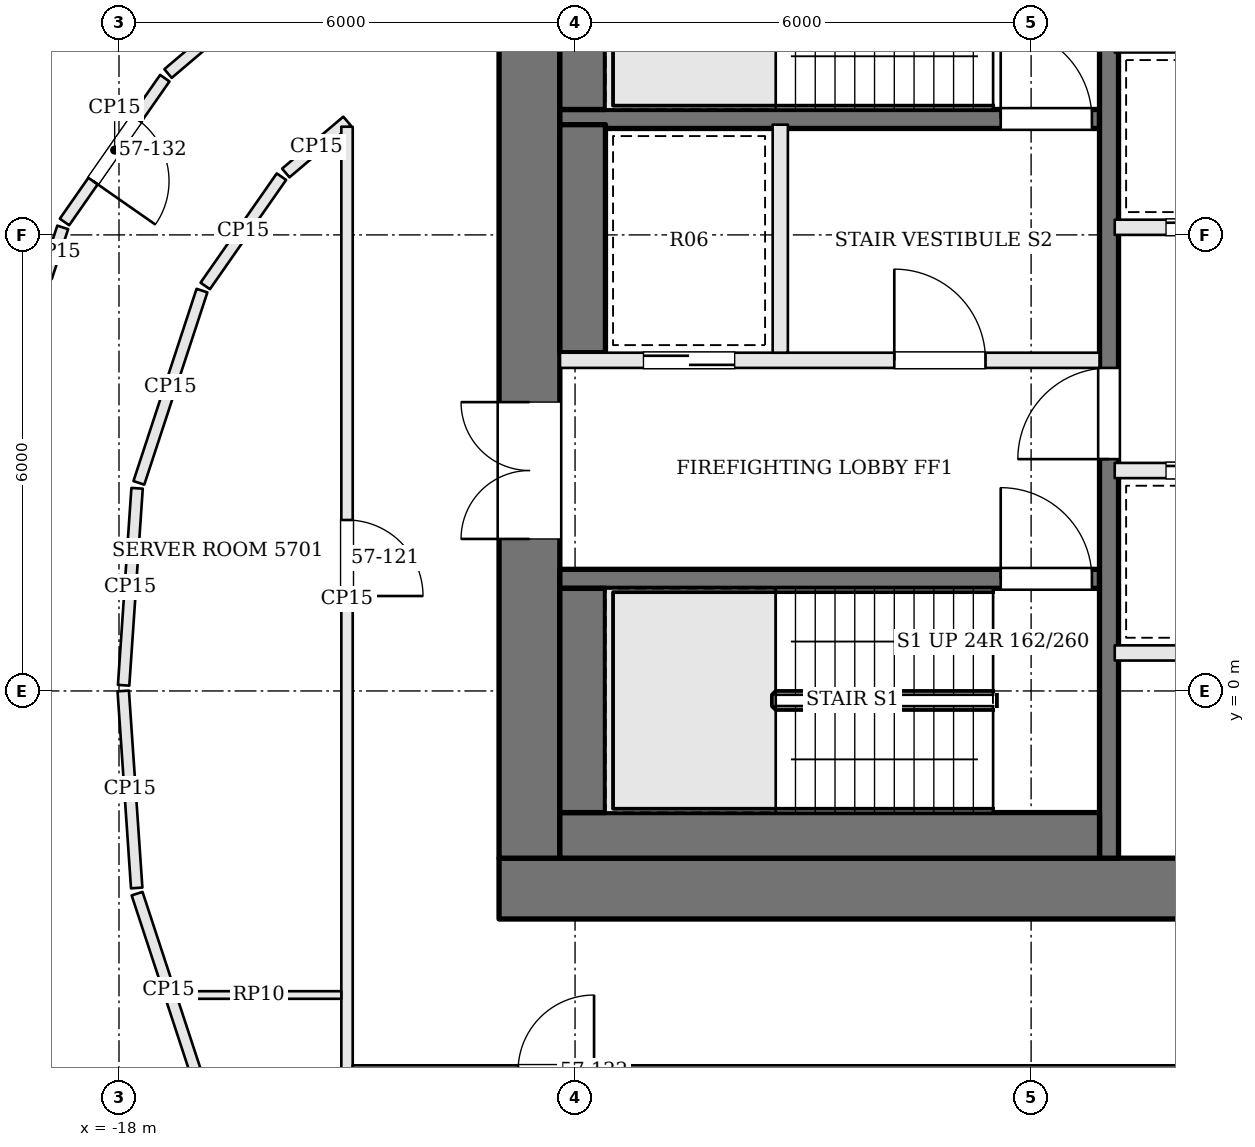
"""IFC4 building model, lengths in metres.
Left out: names, types, materials, properties, quantities, classifications, styles, units other than length and angle.
Written with IfcOpenShell. Run it as: python <this file> out.ifc"""

import sys

from ifc_helpers import new_model, si_unit, direction, frame, frame_2d, origin, place, context, subcontext, project, spatial, rectangle, extrude, element, fill, save


model = new_model("IFC4")
c1 = context("Model", 3, precision=1e-05, world=origin(), true_north=direction((0.0, 1.0)))
c2 = subcontext(c1, "Body", "Model", "MODEL_VIEW")
j1 = project(units=[si_unit("LENGTHUNIT", "METRE"), si_unit("PLANEANGLEUNIT", "RADIAN")], contexts=[c1])
p1 = place(None, origin())
s1 = spatial("IfcSite", under=j1, at=p1, CompositionType="ELEMENT")
p2 = place(p1, origin())
s2 = spatial("IfcBuilding", under=s1, at=p2, CompositionType="ELEMENT")
p3 = place(p2, frame((0.0, 0.0, 233.1)))
s3 = spatial("IfcBuildingStorey", under=s2, at=p3, CompositionType="ELEMENT", Elevation=233.1)
p4 = place(p3, frame((-13.0, -2.6, 0.0), z_axis=(0.0, 0.0, 1.0), x_axis=(1.0, 0.0, 0.0)))
e1 = element("IfcWall", 1, at=p4, inside=s3, PredefinedType="SHEAR", context=c2, shape_type="SweptSolid", body=[
    extrude(rectangle(XDim=26.0, YDim=0.8, at=frame_2d((13.0, 0.0))), origin(), (0.0, 0.0, 1.0), 3.9),
])
p5 = place(p4, frame((9.2, 0.0, 0.0)))
e2 = element("IfcOpeningElement", 2, at=p5, cuts=e1, PredefinedType="OPENING", context=c2, shape_type="SweptSolid", body=[
    extrude(rectangle(XDim=0.9, YDim=2.1, at=frame_2d((0.45, 1.05))), frame((0.0, 0.41, 0.0), z_axis=(0.0, -1.0, 0.0), x_axis=(1.0, 0.0, 0.0)), (0.0, 0.0, 1.0), 0.82),
])
p6 = place(p4, frame((12.3, 0.0, 0.0)))
e3 = element("IfcOpeningElement", 3, at=p6, cuts=e1, PredefinedType="OPENING", context=c2, shape_type="SweptSolid", body=[
    extrude(rectangle(XDim=0.9, YDim=2.1, at=frame_2d((0.45, 1.05))), frame((0.0, 0.41, 0.0), z_axis=(0.0, -1.0, 0.0), x_axis=(1.0, 0.0, 0.0)), (0.0, 0.0, 1.0), 0.82),
])
p7 = place(p4, frame((14.7, 0.0, 0.0)))
e4 = element("IfcOpeningElement", 4, at=p7, cuts=e1, PredefinedType="OPENING", context=c2, shape_type="SweptSolid", body=[
    extrude(rectangle(XDim=1.0, YDim=2.1, at=frame_2d((0.5, 1.05))), frame((0.0, 0.41, 0.0), z_axis=(0.0, -1.0, 0.0), x_axis=(1.0, 0.0, 0.0)), (0.0, 0.0, 1.0), 0.82),
])
p8 = place(p4, frame((16.55, 0.0, 0.0)))
e5 = element("IfcOpeningElement", 5, at=p8, cuts=e1, PredefinedType="OPENING", context=c2, shape_type="SweptSolid", body=[
    extrude(rectangle(XDim=0.9, YDim=2.1, at=frame_2d((0.45, 1.05))), frame((0.0, 0.41, 0.0), z_axis=(0.0, -1.0, 0.0), x_axis=(1.0, 0.0, 0.0)), (0.0, 0.0, 1.0), 0.82),
])
p9 = place(p3, frame((-12.6, -2.2, 0.0), z_axis=(0.0, 0.0, 1.0), x_axis=(0.0, 1.0, 0.0)))
e6 = element("IfcWall", 6, at=p9, inside=s3, PredefinedType="SHEAR", context=c2, shape_type="SweptSolid", body=[
    extrude(rectangle(XDim=13.4, YDim=0.8, at=frame_2d((6.7, 0.0))), origin(), (0.0, 0.0, 1.0), 3.9),
])
p10 = place(p9, frame((4.2, 0.0, 0.0)))
e7 = element("IfcOpeningElement", 7, at=p10, cuts=e6, PredefinedType="OPENING", context=c2, shape_type="SweptSolid", body=[
    extrude(rectangle(XDim=1.8, YDim=2.1, at=frame_2d((0.9, 1.05))), frame((0.0, 0.41, 0.0), z_axis=(0.0, -1.0, 0.0), x_axis=(1.0, 0.0, 0.0)), (0.0, 0.0, 1.0), 0.82),
])
p11 = place(p3, frame((-12.2, 1.475, 0.0), z_axis=(0.0, 0.0, 1.0), x_axis=(1.0, 0.0, 0.0)))
e8 = element("IfcWall", 8, at=p11, inside=s3, PredefinedType="SOLIDWALL", context=c2, shape_type="SweptSolid", body=[
    extrude(rectangle(XDim=7.1, YDim=0.25, at=frame_2d((3.55, 0.0))), origin(), (0.0, 0.0, 1.0), 3.7),
])
p12 = place(p11, frame((5.8, 0.0, 0.0)))
e9 = element("IfcOpeningElement", 9, at=p12, cuts=e8, PredefinedType="OPENING", context=c2, shape_type="SweptSolid", body=[
    extrude(rectangle(XDim=1.2, YDim=2.1, at=frame_2d((0.6, 1.05))), frame((0.0, 0.135, 0.0), z_axis=(0.0, -1.0, 0.0), x_axis=(1.0, 0.0, 0.0)), (0.0, 0.0, 1.0), 0.27),
])
p13 = place(p3, frame((-12.2, 4.35, 0.0), z_axis=(0.0, 0.0, 1.0), x_axis=(1.0, 0.0, 0.0)))
e10 = element("IfcWall", 10, at=p13, inside=s3, PredefinedType="SOLIDWALL", context=c2, shape_type="SweptSolid", body=[
    extrude(rectangle(XDim=7.1, YDim=0.2, at=frame_2d((3.55, 0.0))), origin(), (0.0, 0.0, 1.0), 3.7),
])
p14 = place(p13, frame((4.4, 0.0, 0.0)))
e11 = element("IfcOpeningElement", 11, at=p14, cuts=e10, PredefinedType="OPENING", context=c2, shape_type="SweptSolid", body=[
    extrude(rectangle(XDim=1.2, YDim=2.1, at=frame_2d((0.6, 1.05))), frame((0.0, 0.11, 0.0), z_axis=(0.0, -1.0, 0.0), x_axis=(1.0, 0.0, 0.0)), (0.0, 0.0, 1.0), 0.22),
])
p15 = place(p13, frame((1.1, 0.0, 0.0)))
e12 = element("IfcOpeningElement", 12, at=p15, cuts=e10, PredefinedType="OPENING", context=c2, shape_type="SweptSolid", body=[
    extrude(rectangle(XDim=1.2, YDim=2.1, at=frame_2d((0.6, 1.05))), frame((0.0, 0.11, 0.0), z_axis=(0.0, -1.0, 0.0), x_axis=(1.0, 0.0, 0.0)), (0.0, 0.0, 1.0), 0.22),
])
p16 = place(p3, frame((-12.2, 7.525, 0.0), z_axis=(0.0, 0.0, 1.0), x_axis=(1.0, 0.0, 0.0)))
e13 = element("IfcWall", 13, at=p16, inside=s3, PredefinedType="SOLIDWALL", context=c2, shape_type="SweptSolid", body=[
    extrude(rectangle(XDim=7.1, YDim=0.25, at=frame_2d((3.55, 0.0))), origin(), (0.0, 0.0, 1.0), 3.7),
])
p17 = place(p16, frame((5.8, 0.0, 0.0)))
e14 = element("IfcOpeningElement", 14, at=p17, cuts=e13, PredefinedType="OPENING", context=c2, shape_type="SweptSolid", body=[
    extrude(rectangle(XDim=1.2, YDim=2.1, at=frame_2d((0.6, 1.05))), frame((0.0, 0.135, 0.0), z_axis=(0.0, -1.0, 0.0), x_axis=(1.0, 0.0, 0.0)), (0.0, 0.0, 1.0), 0.27),
])
p18 = place(p3, frame((-9.3, 4.45, 0.0), z_axis=(0.0, 0.0, 1.0), x_axis=(0.0, 1.0, 0.0)))
e15 = element("IfcWall", 15, at=p18, inside=s3, PredefinedType="SOLIDWALL", context=c2, shape_type="SweptSolid", body=[
    extrude(rectangle(XDim=3.0, YDim=0.2, at=frame_2d((1.5, 0.0))), origin(), (0.0, 0.0, 1.0), 3.7),
])
p19 = place(p3, frame((-4.975, -2.2, 0.0), z_axis=(0.0, 0.0, 1.0), x_axis=(0.0, 1.0, 0.0)))
e16 = element("IfcWall", 16, at=p19, inside=s3, PredefinedType="SOLIDWALL", context=c2, shape_type="SweptSolid", body=[
    extrude(rectangle(XDim=13.4, YDim=0.25, at=frame_2d((6.7, 0.0))), origin(), (0.0, 0.0, 1.0), 3.7),
])
p20 = place(p19, frame((5.25, 0.0, 0.0)))
e17 = element("IfcOpeningElement", 17, at=p20, cuts=e16, PredefinedType="OPENING", context=c2, shape_type="SweptSolid", body=[
    extrude(rectangle(XDim=1.2, YDim=2.1, at=frame_2d((0.6, 1.05))), frame((0.0, 0.135, 0.0), z_axis=(0.0, -1.0, 0.0), x_axis=(1.0, 0.0, 0.0)), (0.0, 0.0, 1.0), 0.27),
])
p21 = place(p3, frame((-12.2, -1.9, 0.0), z_axis=(0.0, 0.0, 1.0), x_axis=(1.0, 0.0, 0.0)))
e18 = element("IfcWall", 18, at=p21, inside=s3, PredefinedType="SOLIDWALL", context=c2, shape_type="SweptSolid", body=[
    extrude(rectangle(XDim=7.1, YDim=0.6, at=frame_2d((3.55, 0.0))), origin(), (0.0, 0.0, 1.0), 3.7),
])
p22 = place(p3, frame((-11.9, -1.6, 0.0), z_axis=(0.0, 0.0, 1.0), x_axis=(0.0, 1.0, 0.0)))
e19 = element("IfcWall", 19, at=p22, inside=s3, PredefinedType="SOLIDWALL", context=c2, shape_type="SweptSolid", body=[
    extrude(rectangle(XDim=2.95, YDim=0.6, at=frame_2d((1.475, 0.0))), origin(), (0.0, 0.0, 1.0), 3.7),
])
p23 = place(p3, frame((-11.9, 4.45, 0.0), z_axis=(0.0, 0.0, 1.0), x_axis=(0.0, 1.0, 0.0)))
e20 = element("IfcWall", 20, at=p23, inside=s3, PredefinedType="SOLIDWALL", context=c2, shape_type="SweptSolid", body=[
    extrude(rectangle(XDim=3.0, YDim=0.6, at=frame_2d((1.5, 0.0))), origin(), (0.0, 0.0, 1.0), 3.7),
])
p24 = place(p3, frame((-11.9, 7.65, 0.0), z_axis=(0.0, 0.0, 1.0), x_axis=(0.0, 1.0, 0.0)))
e21 = element("IfcWall", 21, at=p24, inside=s3, PredefinedType="SOLIDWALL", context=c2, shape_type="SweptSolid", body=[
    extrude(rectangle(XDim=2.95, YDim=0.6, at=frame_2d((1.475, 0.0))), origin(), (0.0, 0.0, 1.0), 3.7),
])
p25 = place(p3, frame((-4.9, 0.5, 0.0), z_axis=(0.0, 0.0, 1.0), x_axis=(1.0, 0.0, 0.0)))
e22 = element("IfcWall", 22, at=p25, inside=s3, PredefinedType="SOLIDWALL", context=c2, shape_type="SweptSolid", body=[
    extrude(rectangle(XDim=9.8, YDim=0.2, at=frame_2d((4.9, 0.0))), origin(), (0.0, 0.0, 1.0), 3.7),
])
p26 = place(p3, frame((-4.9, 2.9, 0.0), z_axis=(0.0, 0.0, 1.0), x_axis=(1.0, 0.0, 0.0)))
e23 = element("IfcWall", 23, at=p26, inside=s3, PredefinedType="SOLIDWALL", context=c2, shape_type="SweptSolid", body=[
    extrude(rectangle(XDim=9.8, YDim=0.2, at=frame_2d((4.9, 0.0))), origin(), (0.0, 0.0, 1.0), 3.7),
])
p27 = place(p26, frame((0.675, 0.0, 0.0)))
e24 = element("IfcOpeningElement", 24, at=p27, cuts=e23, PredefinedType="OPENING", context=c2, shape_type="SweptSolid", body=[
    extrude(rectangle(XDim=1.1, YDim=2.1, at=frame_2d((0.55, 1.05))), frame((0.0, 0.11, 0.0), z_axis=(0.0, -1.0, 0.0), x_axis=(1.0, 0.0, 0.0)), (0.0, 0.0, 1.0), 0.22),
])
p28 = place(p26, frame((2.613, 0.0, 0.0)))
e25 = element("IfcOpeningElement", 25, at=p28, cuts=e23, PredefinedType="OPENING", context=c2, shape_type="SweptSolid", body=[
    extrude(rectangle(XDim=0.9, YDim=2.1, at=frame_2d((0.45, 1.05))), frame((0.0, 0.11, 0.0), z_axis=(0.0, -1.0, 0.0), x_axis=(1.0, 0.0, 0.0)), (0.0, 0.0, 1.0), 0.22),
])
p29 = place(p26, frame((4.35, 0.0, 0.0)))
e26 = element("IfcOpeningElement", 26, at=p29, cuts=e23, PredefinedType="OPENING", context=c2, shape_type="SweptSolid", body=[
    extrude(rectangle(XDim=1.1, YDim=2.1, at=frame_2d((0.55, 1.05))), frame((0.0, 0.11, 0.0), z_axis=(0.0, -1.0, 0.0), x_axis=(1.0, 0.0, 0.0)), (0.0, 0.0, 1.0), 0.22),
])
p30 = place(p26, frame((7.463, 0.0, 0.0)))
e27 = element("IfcOpeningElement", 27, at=p30, cuts=e23, PredefinedType="OPENING", context=c2, shape_type="SweptSolid", body=[
    extrude(rectangle(XDim=1.0, YDim=2.1, at=frame_2d((0.5, 1.05))), frame((0.0, 0.11, 0.0), z_axis=(0.0, -1.0, 0.0), x_axis=(1.0, 0.0, 0.0)), (0.0, 0.0, 1.0), 0.22),
])
p31 = place(p3, frame((-4.9, 6.1, 0.0), z_axis=(0.0, 0.0, 1.0), x_axis=(1.0, 0.0, 0.0)))
e28 = element("IfcWall", 28, at=p31, inside=s3, PredefinedType="SOLIDWALL", context=c2, shape_type="SweptSolid", body=[
    extrude(rectangle(XDim=9.8, YDim=0.2, at=frame_2d((4.9, 0.0))), origin(), (0.0, 0.0, 1.0), 3.7),
])
p32 = place(p31, frame((0.675, 0.0, 0.0)))
e29 = element("IfcOpeningElement", 29, at=p32, cuts=e28, PredefinedType="OPENING", context=c2, shape_type="SweptSolid", body=[
    extrude(rectangle(XDim=1.1, YDim=2.1, at=frame_2d((0.55, 1.05))), frame((0.0, 0.11, 0.0), z_axis=(0.0, -1.0, 0.0), x_axis=(1.0, 0.0, 0.0)), (0.0, 0.0, 1.0), 0.22),
])
p33 = place(p31, frame((3.125, 0.0, 0.0)))
e30 = element("IfcOpeningElement", 30, at=p33, cuts=e28, PredefinedType="OPENING", context=c2, shape_type="SweptSolid", body=[
    extrude(rectangle(XDim=1.1, YDim=2.1, at=frame_2d((0.55, 1.05))), frame((0.0, 0.11, 0.0), z_axis=(0.0, -1.0, 0.0), x_axis=(1.0, 0.0, 0.0)), (0.0, 0.0, 1.0), 0.22),
])
p34 = place(p31, frame((5.575, 0.0, 0.0)))
e31 = element("IfcOpeningElement", 31, at=p34, cuts=e28, PredefinedType="OPENING", context=c2, shape_type="SweptSolid", body=[
    extrude(rectangle(XDim=1.1, YDim=2.1, at=frame_2d((0.55, 1.05))), frame((0.0, 0.11, 0.0), z_axis=(0.0, -1.0, 0.0), x_axis=(1.0, 0.0, 0.0)), (0.0, 0.0, 1.0), 0.22),
])
p35 = place(p31, frame((8.025, 0.0, 0.0)))
e32 = element("IfcOpeningElement", 32, at=p35, cuts=e28, PredefinedType="OPENING", context=c2, shape_type="SweptSolid", body=[
    extrude(rectangle(XDim=1.1, YDim=2.1, at=frame_2d((0.55, 1.05))), frame((0.0, 0.11, 0.0), z_axis=(0.0, -1.0, 0.0), x_axis=(1.0, 0.0, 0.0)), (0.0, 0.0, 1.0), 0.22),
])
p36 = place(p3, frame((-15.057, 10.073, 0.0), z_axis=(0.0, 0.0, 1.0), x_axis=(-0.762398905861, -0.647107339119, 0.0)))
e33 = element("IfcWall", 33, at=p36, inside=s3, PredefinedType="PARTITIONING", context=c2, shape_type="SweptSolid", body=[
    extrude(rectangle(XDim=3.013, YDim=0.15, at=frame_2d((1.507, 0.0))), origin(), (0.0, 0.0, 1.0), 3.084),
])
p37 = place(p3, frame((-17.397, 8.062, 0.0), z_axis=(0.0, 0.0, 1.0), x_axis=(-0.572118665737, -0.820170855563, 0.0)))
e34 = element("IfcWall", 34, at=p37, inside=s3, PredefinedType="PARTITIONING", context=c2, shape_type="SweptSolid", body=[
    extrude(rectangle(XDim=2.306, YDim=0.15, at=frame_2d((1.153, 0.0))), origin(), (0.0, 0.0, 1.0), 3.084),
])
p38 = place(p37, frame((0.65, 0.0, 0.0)))
e35 = element("IfcOpeningElement", 35, at=p38, cuts=e34, PredefinedType="OPENING", context=c2, shape_type="SweptSolid", body=[
    extrude(rectangle(XDim=1.0, YDim=2.1, at=frame_2d((0.5, 1.05))), frame((0.0, 0.085, 0.0), z_axis=(0.0, -1.0, 0.0), x_axis=(1.0, 0.0, 0.0)), (0.0, 0.0, 1.0), 0.17),
])
p39 = place(p3, frame((-18.74, 6.099, 0.0), z_axis=(0.0, 0.0, 1.0), x_axis=(-0.311875163268, -0.950123088098, 0.0)))
e36 = element("IfcWall", 36, at=p39, inside=s3, PredefinedType="PARTITIONING", context=c2, shape_type="SweptSolid", body=[
    extrude(rectangle(XDim=0.69, YDim=0.15, at=frame_2d((0.345, 0.0))), origin(), (0.0, 0.0, 1.0), 3.084),
])
p40 = place(p3, frame((-16.932, -5.196, 0.0), z_axis=(0.0, 0.0, 1.0), x_axis=(-0.311904957484, 0.950113307715, 0.0)))
e37 = element("IfcWall", 37, at=p40, inside=s3, PredefinedType="PARTITIONING", context=c2, shape_type="SweptSolid", body=[
    extrude(rectangle(XDim=2.662, YDim=0.15, at=frame_2d((1.331, 0.0))), origin(), (0.0, 0.0, 1.0), 3.084),
])
p41 = place(p3, frame((-17.767, -2.592, 0.0), z_axis=(0.0, 0.0, 1.0), x_axis=(-0.068140828228, 0.997675712608, 0.0)))
e38 = element("IfcWall", 38, at=p41, inside=s3, PredefinedType="PARTITIONING", context=c2, shape_type="SweptSolid", body=[
    extrude(rectangle(XDim=2.598, YDim=0.15, at=frame_2d((1.299, 0.0))), origin(), (0.0, 0.0, 1.0), 3.084),
])
p42 = place(p3, frame((-17.939, 0.075, 0.0), z_axis=(0.0, 0.0, 1.0), x_axis=(0.068227980697, 0.997669756307, 0.0)))
e39 = element("IfcWall", 39, at=p42, inside=s3, PredefinedType="PARTITIONING", context=c2, shape_type="SweptSolid", body=[
    extrude(rectangle(XDim=2.598, YDim=0.15, at=frame_2d((1.299, 0.0))), origin(), (0.0, 0.0, 1.0), 3.084),
])
p43 = place(p3, frame((-17.739, 2.738, 0.0), z_axis=(0.0, 0.0, 1.0), x_axis=(0.311904957484, 0.950113307715, 0.0)))
e40 = element("IfcWall", 40, at=p43, inside=s3, PredefinedType="PARTITIONING", context=c2, shape_type="SweptSolid", body=[
    extrude(rectangle(XDim=2.662, YDim=0.15, at=frame_2d((1.331, 0.0))), origin(), (0.0, 0.0, 1.0), 3.084),
])
p44 = place(p3, frame((-16.865, 5.329, 0.0), z_axis=(0.0, 0.0, 1.0), x_axis=(0.572096615639, 0.820186236397, 0.0)))
e41 = element("IfcWall", 41, at=p44, inside=s3, PredefinedType="PARTITIONING", context=c2, shape_type="SweptSolid", body=[
    extrude(rectangle(XDim=1.753, YDim=0.15, at=frame_2d((0.876, 0.0))), origin(), (0.0, 0.0, 1.0), 3.084),
])
p45 = place(p3, frame((-15.805, 6.814, 0.0), z_axis=(0.0, 0.0, 1.0), x_axis=(0.762298381233, 0.647225755027, 0.0)))
e42 = element("IfcWall", 42, at=p45, inside=s3, PredefinedType="PARTITIONING", context=c2, shape_type="SweptSolid", body=[
    extrude(rectangle(XDim=1.057, YDim=0.15, at=frame_2d((0.528, 0.0))), origin(), (0.0, 0.0, 1.0), 3.084),
])
p46 = place(p3, frame((-15.0, 7.423, 0.0), z_axis=(0.0, 0.0, 1.0), x_axis=(0.0, -1.0, 0.0)))
e43 = element("IfcWall", 43, at=p46, inside=s3, PredefinedType="PARTITIONING", context=c2, shape_type="SweptSolid", body=[
    extrude(rectangle(XDim=12.423, YDim=0.15, at=frame_2d((6.211, 0.0))), origin(), (0.0, 0.0, 1.0), 3.084),
])
p47 = place(p46, frame((5.174, 0.0, 0.0)))
e44 = element("IfcOpeningElement", 44, at=p47, cuts=e43, PredefinedType="OPENING", context=c2, shape_type="SweptSolid", body=[
    extrude(rectangle(XDim=1.0, YDim=2.1, at=frame_2d((0.5, 1.05))), frame((0.0, 0.085, 0.0), z_axis=(0.0, -1.0, 0.0), x_axis=(1.0, 0.0, 0.0)), (0.0, 0.0, 1.0), 0.17),
])
p48 = place(p3, frame((-14.925, -5.0, 0.0), z_axis=(0.0, 0.0, 1.0), x_axis=(1.0, 0.0, 0.0)))
e45 = element("IfcWall", 45, at=p48, inside=s3, PredefinedType="PARTITIONING", context=c2, shape_type="SweptSolid", body=[
    extrude(rectangle(XDim=29.925, YDim=0.15, at=frame_2d((14.962, 0.0))), origin(), (0.0, 0.0, 1.0), 3.084),
])
p49 = place(p48, frame((2.175, 0.0, 0.0)))
e46 = element("IfcOpeningElement", 46, at=p49, cuts=e45, PredefinedType="OPENING", context=c2, shape_type="SweptSolid", body=[
    extrude(rectangle(XDim=1.0, YDim=2.4, at=frame_2d((0.5, 1.2))), frame((0.0, 0.085, 0.0), z_axis=(0.0, -1.0, 0.0), x_axis=(1.0, 0.0, 0.0)), (0.0, 0.0, 1.0), 0.17),
])
p50 = place(p48, frame((14.025, 0.0, 0.0)))
e47 = element("IfcOpeningElement", 47, at=p50, cuts=e45, PredefinedType="OPENING", context=c2, shape_type="SweptSolid", body=[
    extrude(rectangle(XDim=1.8, YDim=2.1, at=frame_2d((0.9, 1.05))), frame((0.0, 0.085, 0.0), z_axis=(0.0, -1.0, 0.0), x_axis=(1.0, 0.0, 0.0)), (0.0, 0.0, 1.0), 0.17),
])
p51 = place(p48, frame((26.825, 0.0, 0.0)))
e48 = element("IfcOpeningElement", 48, at=p51, cuts=e45, PredefinedType="OPENING", context=c2, shape_type="SweptSolid", body=[
    extrude(rectangle(XDim=0.7, YDim=2.1, at=frame_2d((0.35, 1.05))), frame((0.0, 0.085, 0.0), z_axis=(0.0, -1.0, 0.0), x_axis=(1.0, 0.0, 0.0)), (0.0, 0.0, 1.0), 0.17),
])
p52 = place(p3, frame((-17.249, -4.0, 0.0), z_axis=(0.0, 0.0, 1.0), x_axis=(1.0, 0.0, 0.0)))
e49 = element("IfcWall", 49, at=p52, inside=s3, PredefinedType="PARTITIONING", context=c2, shape_type="SweptSolid", body=[
    extrude(rectangle(XDim=2.174, YDim=0.1, at=frame_2d((1.087, 0.0))), origin(), (0.0, 0.0, 1.0), 3.084),
])
p53 = place(p10, origin())
e50 = element("IfcDoor", 50, at=p53, inside=s3, OperationType="DOUBLE_DOOR_SINGLE_SWING", PredefinedType="DOOR", context=c2, shape_type="SweptSolid", body=[
    extrude(rectangle(XDim=1.8, YDim=2.1, at=frame_2d((0.9, 1.05))), frame((0.0, 0.025, 0.0), z_axis=(0.0, -1.0, 0.0), x_axis=(1.0, 0.0, 0.0)), (0.0, 0.0, 1.0), 0.05),
])
fill(e7, e50)
p54 = place(p20, origin())
e51 = element("IfcDoor", 51, at=p54, inside=s3, OperationType="SINGLE_SWING_LEFT", PredefinedType="DOOR", context=c2, shape_type="SweptSolid", body=[
    extrude(rectangle(XDim=1.2, YDim=2.1, at=frame_2d((0.6, 1.05))), frame((0.0, 0.025, 0.0), z_axis=(0.0, -1.0, 0.0), x_axis=(1.0, 0.0, 0.0)), (0.0, 0.0, 1.0), 0.05),
])
fill(e17, e51)
p55 = place(p14, origin())
e52 = element("IfcDoor", 52, at=p55, inside=s3, OperationType="SINGLE_SWING_LEFT", PredefinedType="DOOR", context=c2, shape_type="SweptSolid", body=[
    extrude(rectangle(XDim=1.2, YDim=2.1, at=frame_2d((0.6, 1.05))), frame((0.0, 0.025, 0.0), z_axis=(0.0, -1.0, 0.0), x_axis=(1.0, 0.0, 0.0)), (0.0, 0.0, 1.0), 0.05),
])
fill(e11, e52)
p56 = place(p12, origin())
e53 = element("IfcDoor", 53, at=p56, inside=s3, OperationType="SINGLE_SWING_LEFT", PredefinedType="DOOR", context=c2, shape_type="SweptSolid", body=[
    extrude(rectangle(XDim=1.2, YDim=2.1, at=frame_2d((0.6, 1.05))), frame((0.0, 0.025, 0.0), z_axis=(0.0, -1.0, 0.0), x_axis=(1.0, 0.0, 0.0)), (0.0, 0.0, 1.0), 0.05),
])
fill(e9, e53)
p57 = place(p17, origin())
e54 = element("IfcDoor", 54, at=p57, inside=s3, OperationType="SINGLE_SWING_LEFT", PredefinedType="DOOR", context=c2, shape_type="SweptSolid", body=[
    extrude(rectangle(XDim=1.2, YDim=2.1, at=frame_2d((0.6, 1.05))), frame((0.0, 0.025, 0.0), z_axis=(0.0, -1.0, 0.0), x_axis=(1.0, 0.0, 0.0)), (0.0, 0.0, 1.0), 0.05),
])
fill(e14, e54)
p58 = place(p15, origin())
e55 = element("IfcDoor", 55, at=p58, inside=s3, OperationType="SLIDING_TO_RIGHT", PredefinedType="DOOR", context=c2, shape_type="SweptSolid", body=[
    extrude(rectangle(XDim=1.2, YDim=2.1, at=frame_2d((0.6, 1.05))), frame((0.0, 0.025, 0.0), z_axis=(0.0, -1.0, 0.0), x_axis=(1.0, 0.0, 0.0)), (0.0, 0.0, 1.0), 0.05),
])
fill(e12, e55)
p59 = place(p27, origin())
e56 = element("IfcDoor", 56, at=p59, inside=s3, OperationType="SLIDING_TO_RIGHT", PredefinedType="DOOR", context=c2, shape_type="SweptSolid", body=[
    extrude(rectangle(XDim=1.1, YDim=2.1, at=frame_2d((0.55, 1.05))), frame((0.0, 0.025, 0.0), z_axis=(0.0, -1.0, 0.0), x_axis=(1.0, 0.0, 0.0)), (0.0, 0.0, 1.0), 0.05),
])
fill(e24, e56)
p60 = place(p32, origin())
e57 = element("IfcDoor", 57, at=p60, inside=s3, OperationType="SLIDING_TO_RIGHT", PredefinedType="DOOR", context=c2, shape_type="SweptSolid", body=[
    extrude(rectangle(XDim=1.1, YDim=2.1, at=frame_2d((0.55, 1.05))), frame((0.0, 0.025, 0.0), z_axis=(0.0, -1.0, 0.0), x_axis=(1.0, 0.0, 0.0)), (0.0, 0.0, 1.0), 0.05),
])
fill(e29, e57)
p61 = place(p47, origin())
e58 = element("IfcDoor", 58, at=p61, inside=s3, OperationType="SINGLE_SWING_RIGHT", PredefinedType="DOOR", context=c2, shape_type="SweptSolid", body=[
    extrude(rectangle(XDim=1.0, YDim=2.1, at=frame_2d((0.5, 1.05))), frame((0.0, 0.025, 0.0), z_axis=(0.0, -1.0, 0.0), x_axis=(1.0, 0.0, 0.0)), (0.0, 0.0, 1.0), 0.05),
])
fill(e44, e58)
p62 = place(p38, origin())
e59 = element("IfcDoor", 59, at=p62, inside=s3, OperationType="SINGLE_SWING_RIGHT", PredefinedType="DOOR", context=c2, shape_type="SweptSolid", body=[
    extrude(rectangle(XDim=1.0, YDim=2.1, at=frame_2d((0.5, 1.05))), frame((0.0, 0.025, 0.0), z_axis=(0.0, -1.0, 0.0), x_axis=(1.0, 0.0, 0.0)), (0.0, 0.0, 1.0), 0.05),
])
fill(e35, e59)
save(model, sys.argv[1])
